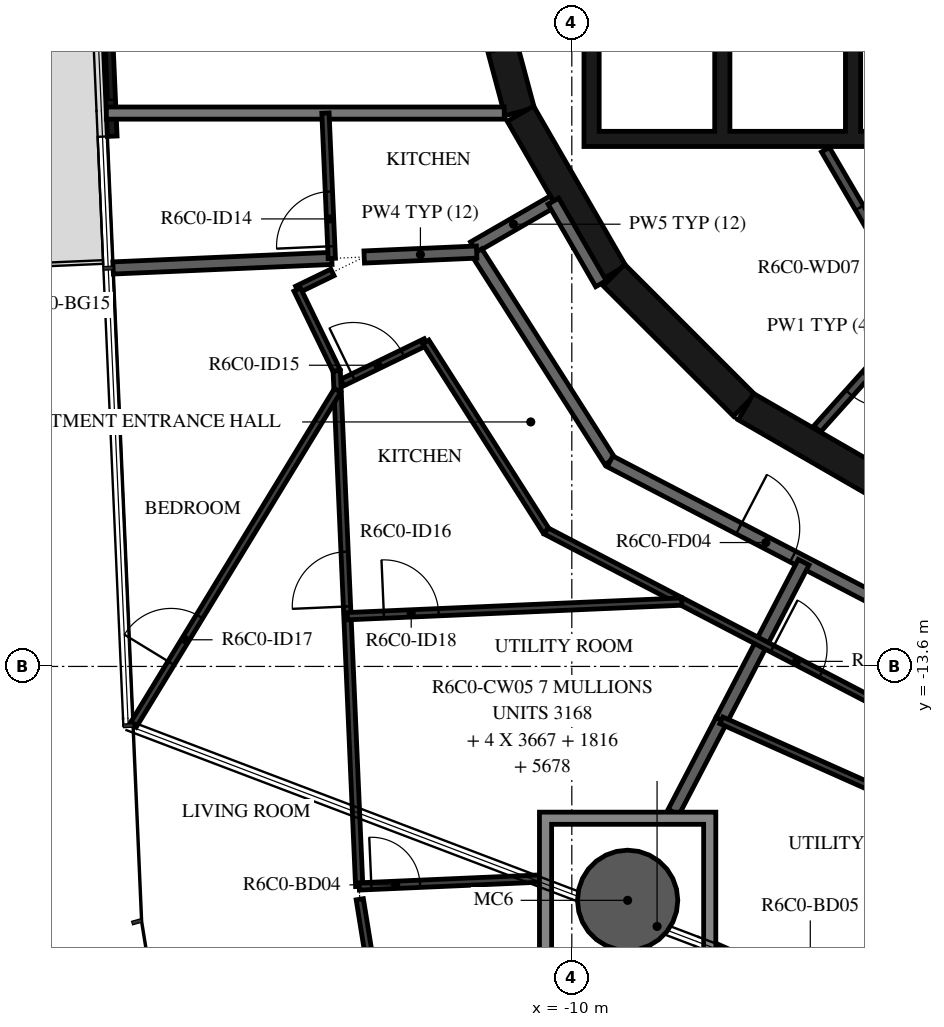
"""IFC4 building model, lengths in metres.
Left out: names, types, materials, properties, quantities, classifications, styles, units other than length and angle.
Written with IfcOpenShell. Run it as: python <this file> out.ifc"""

import sys

from ifc_helpers import new_model, si_unit, direction, frame, frame_2d, origin, origin_2d, place, context, subcontext, project, spatial, polyline, rectangle, hollow_circle, outline, extrude, element, fill, save


model = new_model("IFC4")
c1 = context("Model", 3, precision=1e-05, world=origin(), true_north=direction((0.0, 1.0)))
c2 = subcontext(c1, "Body", "Model", "MODEL_VIEW")
j1 = project(units=[si_unit("LENGTHUNIT", "METRE"), si_unit("PLANEANGLEUNIT", "RADIAN")], contexts=[c1])
p1 = place(None, origin())
s1 = spatial("IfcSite", under=j1, at=p1, CompositionType="ELEMENT")
p2 = place(p1, origin())
s2 = spatial("IfcBuilding", under=s1, at=p2, CompositionType="ELEMENT")
p3 = place(p2, frame((0.0, 0.0, 254.7)))
s3 = spatial("IfcBuildingStorey", under=s2, at=p3, CompositionType="ELEMENT", Elevation=254.7)
p4 = place(p3, frame((-9.082, -17.446, -0.38), z_axis=(0.0, 0.0, 1.0), x_axis=(1.0, 0.0, 0.0)))
e1 = element("IfcColumn", 1, at=p4, inside=s3, PredefinedType="COLUMN", context=c2, shape_type="SweptSolid", body=[
    extrude(hollow_circle(Radius=0.825, WallThickness=0.04, at=origin_2d()), origin(), (0.0, 0.0, 1.0), 2.616),
])
p5 = place(p3, frame((-17.698, -1.684, 0.0), z_axis=(0.0, 0.0, 1.0), x_axis=(0.043639181999, -0.999047357133, 0.0)))
e2 = element("IfcWall", 2, at=p5, inside=s3, PredefinedType="STANDARD", context=c2, shape_type="SweptSolid", body=[
    extrude(rectangle(XDim=3.2, YDim=0.16, at=frame_2d((1.6, 0.0))), origin(), (0.0, 0.0, 1.0), 3.05),
])
p6 = place(p5, frame((0.2, 0.0, 0.0)))
e3 = element("IfcOpeningElement", 3, at=p6, cuts=e2, PredefinedType="OPENING", context=c2, shape_type="SweptSolid", body=[
    extrude(rectangle(XDim=2.4, YDim=2.4, at=frame_2d((1.2, 1.2))), frame((0.0, 0.09, 0.0), z_axis=(0.0, -1.0, 0.0), x_axis=(1.0, 0.0, 0.0)), (0.0, 0.0, 1.0), 0.18),
])
p7 = place(p3, frame((-11.643, -1.55, 0.0), z_axis=(0.0, 0.0, 1.0), x_axis=(0.258734743916, -0.965948410781, 0.0)))
e4 = element("IfcWall", 4, at=p7, inside=s3, PredefinedType="SHEAR", context=c2, shape_type="SweptSolid", body=[
    extrude(rectangle(XDim=3.033, YDim=0.5, at=frame_2d((1.516, 0.0))), origin(), (0.0, 0.0, 1.0), 3.05),
])
p8 = place(p7, frame((1.066, 0.0, 0.0)))
e5 = element("IfcOpeningElement", 5, at=p8, cuts=e4, PredefinedType="OPENING", context=c2, shape_type="SweptSolid", body=[
    extrude(rectangle(XDim=0.9, YDim=2.1, at=frame_2d((0.45, 1.05))), frame((0.0, 0.26, 0.0), z_axis=(0.0, -1.0, 0.0), x_axis=(1.0, 0.0, 0.0)), (0.0, 0.0, 1.0), 0.52),
])
p9 = place(p3, frame((-10.845, -4.51, 0.0), z_axis=(0.0, 0.0, 1.0), x_axis=(0.500087131594, -0.865975092491, 0.0)))
e6 = element("IfcWall", 6, at=p9, inside=s3, PredefinedType="SHEAR", context=c2, shape_type="SweptSolid", body=[
    extrude(rectangle(XDim=3.033, YDim=0.5, at=frame_2d((1.516, 0.0))), origin(), (0.0, 0.0, 1.0), 3.05),
])
p10 = place(p3, frame((-9.308, -7.164, 0.0), z_axis=(0.0, 0.0, 1.0), x_axis=(0.707106781187, -0.707106781187, 0.0)))
e7 = element("IfcWall", 7, at=p10, inside=s3, PredefinedType="SHEAR", context=c2, shape_type="SweptSolid", body=[
    extrude(rectangle(XDim=3.032, YDim=0.5, at=frame_2d((1.516, 0.0))), origin(), (0.0, 0.0, 1.0), 3.05),
])
p11 = place(p3, frame((-7.137, -9.329, 0.0), z_axis=(0.0, 0.0, 1.0), x_axis=(0.865975092491, -0.500087131594, 0.0)))
e8 = element("IfcWall", 8, at=p11, inside=s3, PredefinedType="SHEAR", context=c2, shape_type="SweptSolid", body=[
    extrude(rectangle(XDim=3.033, YDim=0.5, at=frame_2d((1.516, 0.0))), origin(), (0.0, 0.0, 1.0), 3.05),
])
p12 = place(p3, origin())
e9 = element("IfcWall", 9, at=p12, inside=s3, PredefinedType="SHEAR", context=c2, shape_type="SweptSolid", body=[
    extrude(outline(polyline([(9.8, -5.05), (9.8, -4.8), (9.8, -1.9), (9.55, -1.9), (9.55, -4.8), (7.65, -4.8), (7.65, -1.9), (7.4, -1.9), (7.4, -4.8), (5.5, -4.8), (5.5, -1.9), (5.25, -1.9), (5.25, -4.8), (3.35, -4.8), (3.35, -1.9), (3.1, -1.9), (3.1, -4.8), (1.2, -4.8), (1.2, -1.9), (0.95, -1.9), (0.95, -4.8), (-0.95, -4.8), (-0.95, -1.9), (-1.2, -1.9), (-1.2, -4.8), (-3.1, -4.8), (-3.1, -1.9), (-3.35, -1.9), (-3.35, -4.8), (-5.25, -4.8), (-5.25, -1.9), (-5.5, -1.9), (-5.5, -4.8), (-7.4, -4.8), (-7.4, -1.9), (-7.65, -1.9), (-7.65, -4.8), (-9.55, -4.8), (-9.55, -1.9), (-9.8, -1.9), (-9.8, -4.8), (-9.8, -5.05), (9.8, -5.05)])), origin(), (0.0, 0.0, 1.0), 3.05),
])
p13 = place(p3, frame((-5.829, -5.102, 0.0), z_axis=(0.0, 0.0, 1.0), x_axis=(0.504480008384, -0.863423373057, 0.0)))
e10 = element("IfcWall", 10, at=p13, inside=s3, PredefinedType="PARTITIONING", context=c2, shape_type="SweptSolid", body=[
    extrude(rectangle(XDim=3.115, YDim=0.15, at=frame_2d((1.558, 0.0))), origin(), (0.0, 0.0, 1.0), 3.05),
])
p14 = place(p13, frame((1.107, 0.0, 0.0)))
e11 = element("IfcOpeningElement", 11, at=p14, cuts=e10, PredefinedType="OPENING", context=c2, shape_type="SweptSolid", body=[
    extrude(rectangle(XDim=0.9, YDim=2.1, at=frame_2d((0.45, 1.05))), frame((0.0, 0.085, 0.0), z_axis=(0.0, -1.0, 0.0), x_axis=(1.0, 0.0, 0.0)), (0.0, 0.0, 1.0), 0.17),
])
p15 = place(p3, frame((-4.311, -7.851, 0.0), z_axis=(0.0, 0.0, 1.0), x_axis=(-0.667869133096, -0.744278725383, 0.0)))
e12 = element("IfcWall", 12, at=p15, inside=s3, PredefinedType="PARTITIONING", context=c2, shape_type="SweptSolid", body=[
    extrude(rectangle(XDim=2.476, YDim=0.15, at=frame_2d((1.238, 0.0))), origin(), (0.0, 0.0, 1.0), 3.05),
])
p16 = place(p15, frame((0.788, 0.0, 0.0)))
e13 = element("IfcOpeningElement", 13, at=p16, cuts=e12, PredefinedType="OPENING", context=c2, shape_type="SweptSolid", body=[
    extrude(rectangle(XDim=0.9, YDim=2.1, at=frame_2d((0.45, 1.05))), frame((0.0, 0.085, 0.0), z_axis=(0.0, -1.0, 0.0), x_axis=(1.0, 0.0, 0.0)), (0.0, 0.0, 1.0), 0.17),
])
p17 = place(p3, frame((-10.303, -5.949, 0.0), z_axis=(0.0, 0.0, 1.0), x_axis=(-0.866043382451, -0.499968858743, 0.0)))
e14 = element("IfcWall", 14, at=p17, inside=s3, PredefinedType="STANDARD", context=c2, shape_type="SweptSolid", body=[
    extrude(rectangle(XDim=1.515, YDim=0.2, at=frame_2d((0.758, 0.0))), origin(), (0.0, 0.0, 1.0), 3.05),
])
p18 = place(p3, frame((-9.52, -7.305, 0.0), z_axis=(0.0, 0.0, 1.0), x_axis=(-0.500028278809, 0.866009076391, 0.0)))
e15 = element("IfcWall", 15, at=p18, inside=s3, PredefinedType="STANDARD", context=c2, shape_type="SweptSolid", body=[
    extrude(rectangle(XDim=1.566, YDim=0.2, at=frame_2d((0.783, 0.0))), origin(), (0.0, 0.0, 1.0), 3.05),
])
p19 = place(p3, frame((-11.565, -6.786, 0.0), z_axis=(0.0, 0.0, 1.0), x_axis=(0.537297327359, -0.843392898958, 0.0)))
e16 = element("IfcWall", 16, at=p19, inside=s3, PredefinedType="STANDARD", context=c2, shape_type="SweptSolid", body=[
    extrude(rectangle(XDim=4.081, YDim=0.2, at=frame_2d((2.041, 0.0))), origin(), (0.0, 0.0, 1.0), 3.05),
])
p20 = place(p3, frame((-9.372, -10.228, 0.0), z_axis=(0.0, 0.0, 1.0), x_axis=(0.887005184532, -0.461759464021, 0.0)))
e17 = element("IfcWall", 17, at=p20, inside=s3, PredefinedType="STANDARD", context=c2, shape_type="SweptSolid", body=[
    extrude(rectangle(XDim=7.181, YDim=0.2, at=frame_2d((3.591, 0.0))), origin(), (0.0, 0.0, 1.0), 3.05),
])
p21 = place(p20, frame((2.391, 0.0, 0.0)))
e18 = element("IfcOpeningElement", 18, at=p21, cuts=e17, PredefinedType="OPENING", context=c2, shape_type="SweptSolid", body=[
    extrude(rectangle(XDim=1.0, YDim=2.1, at=frame_2d((0.5, 1.05))), frame((0.0, 0.11, 0.0), z_axis=(0.0, -1.0, 0.0), x_axis=(1.0, 0.0, 0.0)), (0.0, 0.0, 1.0), 0.22),
])
p22 = place(p3, frame((-17.655, -4.5, 0.0), z_axis=(0.0, 0.0, 1.0), x_axis=(1.0, 0.0, 0.0)))
e19 = element("IfcWall", 19, at=p22, inside=s3, PredefinedType="STANDARD", context=c2, shape_type="SweptSolid", body=[
    extrude(rectangle(XDim=6.543, YDim=0.2, at=frame_2d((3.272, 0.0))), origin(), (0.0, 0.0, 1.0), 3.05),
])
p23 = place(p3, frame((-17.544, -7.047, 0.0), z_axis=(0.0, 0.0, 1.0), x_axis=(0.999045894436, 0.043672655174, 0.0)))
e20 = element("IfcWall", 20, at=p23, inside=s3, PredefinedType="STANDARD", context=c2, shape_type="SweptSolid", body=[
    extrude(rectangle(XDim=3.6, YDim=0.2, at=frame_2d((1.8, 0.0))), origin(), (0.0, 0.0, 1.0), 3.05),
])
p24 = place(p3, frame((-13.414, -6.867, 0.0), z_axis=(0.0, 0.0, 1.0), x_axis=(0.999046427216, 0.043660465726, 0.0)))
e21 = element("IfcWall", 21, at=p24, inside=s3, PredefinedType="STANDARD", context=c2, shape_type="SweptSolid", body=[
    extrude(rectangle(XDim=1.851, YDim=0.2, at=frame_2d((0.925, 0.0))), origin(), (0.0, 0.0, 1.0), 3.05),
])
p25 = place(p3, frame((-7.541, -14.486, 0.0), z_axis=(0.0, 0.0, 1.0), x_axis=(0.461746051786, 0.88701216658, 0.0)))
e22 = element("IfcWall", 22, at=p25, inside=s3, PredefinedType="STANDARD", context=c2, shape_type="SweptSolid", body=[
    extrude(rectangle(XDim=2.931, YDim=0.2, at=frame_2d((1.466, 0.0))), origin(), (0.0, 0.0, 1.0), 3.05),
])
p26 = place(p3, frame((-8.327, -15.996, 0.0), z_axis=(0.0, 0.0, 1.0), x_axis=(0.461722915657, 0.887024210017, 0.0)))
e23 = element("IfcWall", 23, at=p26, inside=s3, PredefinedType="STANDARD", context=c2, shape_type="SweptSolid", body=[
    extrude(rectangle(XDim=1.703, YDim=0.2, at=frame_2d((0.851, 0.0))), origin(), (0.0, 0.0, 1.0), 3.05),
])
p27 = place(p3, frame((-13.947, -6.89, 0.0), z_axis=(0.0, 0.0, 1.0), x_axis=(-0.043680814195, 0.999045537737, 0.0)))
e24 = element("IfcWall", 24, at=p27, inside=s3, PredefinedType="PARTITIONING", context=c2, shape_type="SweptSolid", body=[
    extrude(rectangle(XDim=2.392, YDim=0.12, at=frame_2d((1.196, 0.0))), origin(), (0.0, 0.0, 1.0), 3.05),
])
p28 = place(p27, frame((0.2, 0.0, 0.0)))
e25 = element("IfcOpeningElement", 25, at=p28, cuts=e24, PredefinedType="OPENING", context=c2, shape_type="SweptSolid", body=[
    extrude(rectangle(XDim=0.9, YDim=2.1, at=frame_2d((0.45, 1.05))), frame((0.0, 0.07, 0.0), z_axis=(0.0, -1.0, 0.0), x_axis=(1.0, 0.0, 0.0)), (0.0, 0.0, 1.0), 0.14),
])
p29 = place(p3, frame((-13.937, -7.121, 0.0), z_axis=(0.0, 0.0, 1.0), x_axis=(-0.899601864835, -0.436710985418, 0.0)))
e26 = element("IfcWall", 26, at=p29, inside=s3, PredefinedType="PARTITIONING", context=c2, shape_type="SweptSolid", body=[
    extrude(rectangle(XDim=0.644, YDim=0.12, at=frame_2d((0.322, 0.0))), origin(), (0.0, 0.0, 1.0), 3.05),
])
p30 = place(p3, frame((-14.516, -7.402, 0.0), z_axis=(0.0, 0.0, 1.0), x_axis=(0.436676244377, -0.899618729016, 0.0)))
e27 = element("IfcWall", 27, at=p30, inside=s3, PredefinedType="PARTITIONING", context=c2, shape_type="SweptSolid", body=[
    extrude(rectangle(XDim=1.487, YDim=0.12, at=frame_2d((0.744, 0.0))), origin(), (0.0, 0.0, 1.0), 3.05),
])
p31 = place(p3, frame((-13.773, -8.931, 0.0), z_axis=(0.0, 0.0, 1.0), x_axis=(0.899585443678, 0.436744810527, 0.0)))
e28 = element("IfcWall", 28, at=p31, inside=s3, PredefinedType="PARTITIONING", context=c2, shape_type="SweptSolid", body=[
    extrude(rectangle(XDim=1.525, YDim=0.12, at=frame_2d((0.762, 0.0))), origin(), (0.0, 0.0, 1.0), 3.05),
])
p32 = place(p31, frame((0.2, 0.0, 0.0)))
e29 = element("IfcOpeningElement", 29, at=p32, cuts=e28, PredefinedType="OPENING", context=c2, shape_type="SweptSolid", body=[
    extrude(rectangle(XDim=0.9, YDim=2.1, at=frame_2d((0.45, 1.05))), frame((0.0, 0.07, 0.0), z_axis=(0.0, -1.0, 0.0), x_axis=(1.0, 0.0, 0.0)), (0.0, 0.0, 1.0), 0.14),
])
p33 = place(p3, frame((-12.402, -8.265, 0.0), z_axis=(0.0, 0.0, 1.0), x_axis=(0.537321213777, -0.843377681247, 0.0)))
e30 = element("IfcWall", 30, at=p33, inside=s3, PredefinedType="PARTITIONING", context=c2, shape_type="SweptSolid", body=[
    extrude(rectangle(XDim=3.685, YDim=0.12, at=frame_2d((1.843, 0.0))), origin(), (0.0, 0.0, 1.0), 3.05),
])
p34 = place(p3, frame((-10.421, -11.373, 0.0), z_axis=(0.0, 0.0, 1.0), x_axis=(0.887012970857, -0.461744506769, 0.0)))
e31 = element("IfcWall", 31, at=p34, inside=s3, PredefinedType="PARTITIONING", context=c2, shape_type="SweptSolid", body=[
    extrude(rectangle(XDim=7.985, YDim=0.12, at=frame_2d((3.992, 0.0))), origin(), (0.0, 0.0, 1.0), 3.05),
])
p35 = place(p34, frame((4.192, 0.0, 0.0)))
e32 = element("IfcOpeningElement", 32, at=p35, cuts=e31, PredefinedType="OPENING", context=c2, shape_type="SweptSolid", body=[
    extrude(rectangle(XDim=0.9, YDim=2.1, at=frame_2d((0.45, 1.05))), frame((0.0, 0.07, 0.0), z_axis=(0.0, -1.0, 0.0), x_axis=(1.0, 0.0, 0.0)), (0.0, 0.0, 1.0), 0.14),
])
p36 = place(p3, frame((-13.496, -17.218, 0.0), z_axis=(0.0, 0.0, 1.0), x_axis=(-0.043640714674, 0.999047290183, 0.0)))
e33 = element("IfcWall", 33, at=p36, inside=s3, PredefinedType="PARTITIONING", context=c2, shape_type="SweptSolid", body=[
    extrude(rectangle(XDim=8.487, YDim=0.12, at=frame_2d((4.243, 0.0))), origin(), (0.0, 0.0, 1.0), 3.05),
])
p37 = place(p36, frame((4.608, 0.0, 0.0)))
e34 = element("IfcOpeningElement", 34, at=p37, cuts=e33, PredefinedType="OPENING", context=c2, shape_type="SweptSolid", body=[
    extrude(rectangle(XDim=0.9, YDim=2.1, at=frame_2d((0.45, 1.05))), frame((0.0, 0.07, 0.0), z_axis=(0.0, -1.0, 0.0), x_axis=(1.0, 0.0, 0.0)), (0.0, 0.0, 1.0), 0.14),
])
p38 = place(p3, frame((-17.215, -14.57, 0.0), z_axis=(0.0, 0.0, 1.0), x_axis=(0.520949659667, 0.853587401555, 0.0)))
e35 = element("IfcWall", 35, at=p38, inside=s3, PredefinedType="PARTITIONING", context=c2, shape_type="SweptSolid", body=[
    extrude(rectangle(XDim=6.455, YDim=0.12, at=frame_2d((3.228, 0.0))), origin(), (0.0, 0.0, 1.0), 3.05),
])
p39 = place(p38, frame((1.2, 0.0, 0.0)))
e36 = element("IfcOpeningElement", 36, at=p39, cuts=e35, PredefinedType="OPENING", context=c2, shape_type="SweptSolid", body=[
    extrude(rectangle(XDim=0.9, YDim=2.1, at=frame_2d((0.45, 1.05))), frame((0.0, 0.07, 0.0), z_axis=(0.0, -1.0, 0.0), x_axis=(1.0, 0.0, 0.0)), (0.0, 0.0, 1.0), 0.14),
])
p40 = place(p3, frame((-13.69, -12.774, 0.0), z_axis=(0.0, 0.0, 1.0), x_axis=(0.999048778431, 0.043606631553, 0.0)))
e37 = element("IfcWall", 37, at=p40, inside=s3, PredefinedType="PARTITIONING", context=c2, shape_type="SweptSolid", body=[
    extrude(rectangle(XDim=5.503, YDim=0.12, at=frame_2d((2.752, 0.0))), origin(), (0.0, 0.0, 1.0), 3.05),
])
p41 = place(p40, frame((0.6, 0.0, 0.0)))
e38 = element("IfcOpeningElement", 38, at=p41, cuts=e37, PredefinedType="OPENING", context=c2, shape_type="SweptSolid", body=[
    extrude(rectangle(XDim=0.9, YDim=2.1, at=frame_2d((0.45, 1.05))), frame((0.0, 0.07, 0.0), z_axis=(0.0, -1.0, 0.0), x_axis=(1.0, 0.0, 0.0)), (0.0, 0.0, 1.0), 0.14),
])
p42 = place(p3, frame((-13.292, -18.64, 0.0), z_axis=(0.0, 0.0, 1.0), x_axis=(-0.159363796836, 0.98721992497, 0.0)))
e39 = element("IfcWall", 39, at=p42, inside=s3, PredefinedType="PARTITIONING", context=c2, shape_type="SweptSolid", body=[
    extrude(rectangle(XDim=1.227, YDim=0.12, at=frame_2d((0.614, 0.0))), origin(), (0.0, 0.0, 1.0), 3.05),
])
p43 = place(p3, frame((-13.496, -17.218, 0.0), z_axis=(0.0, 0.0, 1.0), x_axis=(0.999044946677, 0.043694330507, 0.0)))
e40 = element("IfcWall", 40, at=p43, inside=s3, PredefinedType="PARTITIONING", context=c2, shape_type="SweptSolid", body=[
    extrude(rectangle(XDim=2.967, YDim=0.12, at=frame_2d((1.483, 0.0))), origin(), (0.0, 0.0, 1.0), 3.05),
])
p44 = place(p43, frame((0.2, 0.0, 0.0)))
e41 = element("IfcOpeningElement", 41, at=p44, cuts=e40, PredefinedType="OPENING", context=c2, shape_type="SweptSolid", body=[
    extrude(rectangle(XDim=0.8, YDim=2.1, at=frame_2d((0.4, 1.05))), frame((0.0, 0.07, 0.0), z_axis=(0.0, -1.0, 0.0), x_axis=(1.0, 0.0, 0.0)), (0.0, 0.0, 1.0), 0.14),
])
p45 = place(p3, frame((-5.256, -19.278, 0.0), z_axis=(0.0, 0.0, 1.0), x_axis=(-0.913284429849, 0.407322415532, 0.0)))
e42 = element("IfcWall", 42, at=p45, inside=s3, PredefinedType="PARTITIONING", context=c2, shape_type="SweptSolid", body=[
    extrude(rectangle(XDim=2.601, YDim=0.12, at=frame_2d((1.301, 0.0))), origin(), (0.0, 0.0, 1.0), 3.05),
])
p46 = place(p45, frame((0.5, 0.0, 0.0)))
e43 = element("IfcOpeningElement", 43, at=p46, cuts=e42, PredefinedType="OPENING", context=c2, shape_type="SweptSolid", body=[
    extrude(rectangle(XDim=0.8, YDim=2.1, at=frame_2d((0.4, 1.05))), frame((0.0, 0.07, 0.0), z_axis=(0.0, -1.0, 0.0), x_axis=(1.0, 0.0, 0.0)), (0.0, 0.0, 1.0), 0.14),
])
p47 = place(p3, frame((-6.932, -20.345, 0.0), z_axis=(0.0, 0.0, 1.0), x_axis=(0.843388627156, 0.537304032726, 0.0)))
e44 = element("IfcWall", 44, at=p47, inside=s3, PredefinedType="PARTITIONING", context=c2, shape_type="SweptSolid", body=[
    extrude(rectangle(XDim=10.246, YDim=0.12, at=frame_2d((5.123, 0.0))), origin(), (0.0, 0.0, 1.0), 3.05),
])
p48 = place(p47, frame((2.138, 0.0, 0.0)))
e45 = element("IfcOpeningElement", 45, at=p48, cuts=e44, PredefinedType="OPENING", context=c2, shape_type="SweptSolid", body=[
    extrude(rectangle(XDim=0.9, YDim=2.1, at=frame_2d((0.45, 1.05))), frame((0.0, 0.07, 0.0), z_axis=(0.0, -1.0, 0.0), x_axis=(1.0, 0.0, 0.0)), (0.0, 0.0, 1.0), 0.14),
])
p49 = place(p47, frame((6.268, 0.0, 0.0)))
e46 = element("IfcOpeningElement", 46, at=p49, cuts=e44, PredefinedType="OPENING", context=c2, shape_type="SweptSolid", body=[
    extrude(rectangle(XDim=0.9, YDim=2.1, at=frame_2d((0.45, 1.05))), frame((0.0, 0.07, 0.0), z_axis=(0.0, -1.0, 0.0), x_axis=(1.0, 0.0, 0.0)), (0.0, 0.0, 1.0), 0.14),
])
p50 = place(p3, frame((-1.773, -17.059, 0.0), z_axis=(0.0, 0.0, 1.0), x_axis=(-0.913279926902, 0.407332511736, 0.0)))
e47 = element("IfcWall", 47, at=p50, inside=s3, PredefinedType="PARTITIONING", context=c2, shape_type="SweptSolid", body=[
    extrude(rectangle(XDim=6.315, YDim=0.12, at=frame_2d((3.158, 0.0))), origin(), (0.0, 0.0, 1.0), 3.05),
])
p51 = place(p50, frame((0.5, 0.0, 0.0)))
e48 = element("IfcOpeningElement", 48, at=p51, cuts=e47, PredefinedType="OPENING", context=c2, shape_type="SweptSolid", body=[
    extrude(rectangle(XDim=0.9, YDim=2.1, at=frame_2d((0.45, 1.05))), frame((0.0, 0.07, 0.0), z_axis=(0.0, -1.0, 0.0), x_axis=(1.0, 0.0, 0.0)), (0.0, 0.0, 1.0), 0.14),
])
p52 = place(p3, origin())
e49 = element("IfcWall", 49, at=p52, inside=s3, PredefinedType="STANDARD", context=c2, shape_type="SweptSolid", body=[
    extrude(outline(polyline([(-7.632, -15.996), (-7.632, -18.896), (-10.532, -18.896), (-10.532, -15.996), (-7.632, -15.996)]), holes=[polyline([(-10.332, -18.696), (-7.832, -18.696), (-7.832, -16.196), (-10.332, -16.196), (-10.332, -18.696)])]), origin(), (0.0, 0.0, 1.0), 3.05),
])
p53 = place(p6, origin())
e50 = element("IfcDoor", 50, at=p53, inside=s3, OperationType="DOUBLE_DOOR_SLIDING", PredefinedType="DOOR", context=c2, shape_type="SweptSolid", body=[
    extrude(rectangle(XDim=2.4, YDim=2.4, at=frame_2d((1.2, 1.2))), frame((0.0, 0.025, 0.0), z_axis=(0.0, -1.0, 0.0), x_axis=(1.0, 0.0, 0.0)), (0.0, 0.0, 1.0), 0.05),
])
fill(e3, e50)
p54 = place(p16, origin())
e51 = element("IfcDoor", 51, at=p54, inside=s3, OperationType="SINGLE_SWING_RIGHT", PredefinedType="DOOR", context=c2, shape_type="SweptSolid", body=[
    extrude(rectangle(XDim=0.9, YDim=2.1, at=frame_2d((0.45, 1.05))), frame((0.0, 0.025, 0.0), z_axis=(0.0, -1.0, 0.0), x_axis=(1.0, 0.0, 0.0)), (0.0, 0.0, 1.0), 0.05),
])
fill(e13, e51)
p55 = place(p14, origin())
e52 = element("IfcDoor", 52, at=p55, inside=s3, OperationType="SINGLE_SWING_LEFT", PredefinedType="DOOR", context=c2, shape_type="SweptSolid", body=[
    extrude(rectangle(XDim=0.9, YDim=2.1, at=frame_2d((0.45, 1.05))), frame((0.0, 0.025, 0.0), z_axis=(0.0, -1.0, 0.0), x_axis=(1.0, 0.0, 0.0)), (0.0, 0.0, 1.0), 0.05),
])
fill(e11, e52)
p56 = place(p28, origin())
e53 = element("IfcDoor", 53, at=p56, inside=s3, OperationType="SINGLE_SWING_LEFT", PredefinedType="DOOR", context=c2, shape_type="SweptSolid", body=[
    extrude(rectangle(XDim=0.9, YDim=2.1, at=frame_2d((0.45, 1.05))), frame((0.0, 0.025, 0.0), z_axis=(0.0, -1.0, 0.0), x_axis=(1.0, 0.0, 0.0)), (0.0, 0.0, 1.0), 0.05),
])
fill(e25, e53)
p57 = place(p21, origin())
e54 = element("IfcDoor", 54, at=p57, inside=s3, OperationType="SINGLE_SWING_RIGHT", PredefinedType="DOOR", context=c2, shape_type="SweptSolid", body=[
    extrude(rectangle(XDim=1.0, YDim=2.1, at=frame_2d((0.5, 1.05))), frame((0.0, 0.025, 0.0), z_axis=(0.0, -1.0, 0.0), x_axis=(1.0, 0.0, 0.0)), (0.0, 0.0, 1.0), 0.05),
])
fill(e18, e54)
p58 = place(p32, origin())
e55 = element("IfcDoor", 55, at=p58, inside=s3, OperationType="SINGLE_SWING_LEFT", PredefinedType="DOOR", context=c2, shape_type="SweptSolid", body=[
    extrude(rectangle(XDim=0.9, YDim=2.1, at=frame_2d((0.45, 1.05))), frame((0.0, 0.025, 0.0), z_axis=(0.0, -1.0, 0.0), x_axis=(1.0, 0.0, 0.0)), (0.0, 0.0, 1.0), 0.05),
])
fill(e29, e55)
p59 = place(p37, origin())
e56 = element("IfcDoor", 56, at=p59, inside=s3, OperationType="SINGLE_SWING_RIGHT", PredefinedType="DOOR", context=c2, shape_type="SweptSolid", body=[
    extrude(rectangle(XDim=0.9, YDim=2.1, at=frame_2d((0.45, 1.05))), frame((0.0, 0.025, 0.0), z_axis=(0.0, -1.0, 0.0), x_axis=(1.0, 0.0, 0.0)), (0.0, 0.0, 1.0), 0.05),
])
fill(e34, e56)
p60 = place(p39, origin())
e57 = element("IfcDoor", 57, at=p60, inside=s3, OperationType="SINGLE_SWING_LEFT", PredefinedType="DOOR", context=c2, shape_type="SweptSolid", body=[
    extrude(rectangle(XDim=0.9, YDim=2.1, at=frame_2d((0.45, 1.05))), frame((0.0, 0.025, 0.0), z_axis=(0.0, -1.0, 0.0), x_axis=(1.0, 0.0, 0.0)), (0.0, 0.0, 1.0), 0.05),
])
fill(e36, e57)
p61 = place(p41, origin())
e58 = element("IfcDoor", 58, at=p61, inside=s3, OperationType="SINGLE_SWING_RIGHT", PredefinedType="DOOR", context=c2, shape_type="SweptSolid", body=[
    extrude(rectangle(XDim=0.9, YDim=2.1, at=frame_2d((0.45, 1.05))), frame((0.0, 0.025, 0.0), z_axis=(0.0, -1.0, 0.0), x_axis=(1.0, 0.0, 0.0)), (0.0, 0.0, 1.0), 0.05),
])
fill(e38, e58)
p62 = place(p44, origin())
e59 = element("IfcDoor", 59, at=p62, inside=s3, OperationType="SINGLE_SWING_RIGHT", PredefinedType="DOOR", context=c2, shape_type="SweptSolid", body=[
    extrude(rectangle(XDim=0.8, YDim=2.1, at=frame_2d((0.4, 1.05))), frame((0.0, 0.025, 0.0), z_axis=(0.0, -1.0, 0.0), x_axis=(1.0, 0.0, 0.0)), (0.0, 0.0, 1.0), 0.05),
])
fill(e41, e59)
p63 = place(p35, origin())
e60 = element("IfcDoor", 60, at=p63, inside=s3, OperationType="SINGLE_SWING_LEFT", PredefinedType="DOOR", context=c2, shape_type="SweptSolid", body=[
    extrude(rectangle(XDim=0.9, YDim=2.1, at=frame_2d((0.45, 1.05))), frame((0.0, 0.025, 0.0), z_axis=(0.0, -1.0, 0.0), x_axis=(1.0, 0.0, 0.0)), (0.0, 0.0, 1.0), 0.05),
])
fill(e32, e60)
save(model, sys.argv[1])
